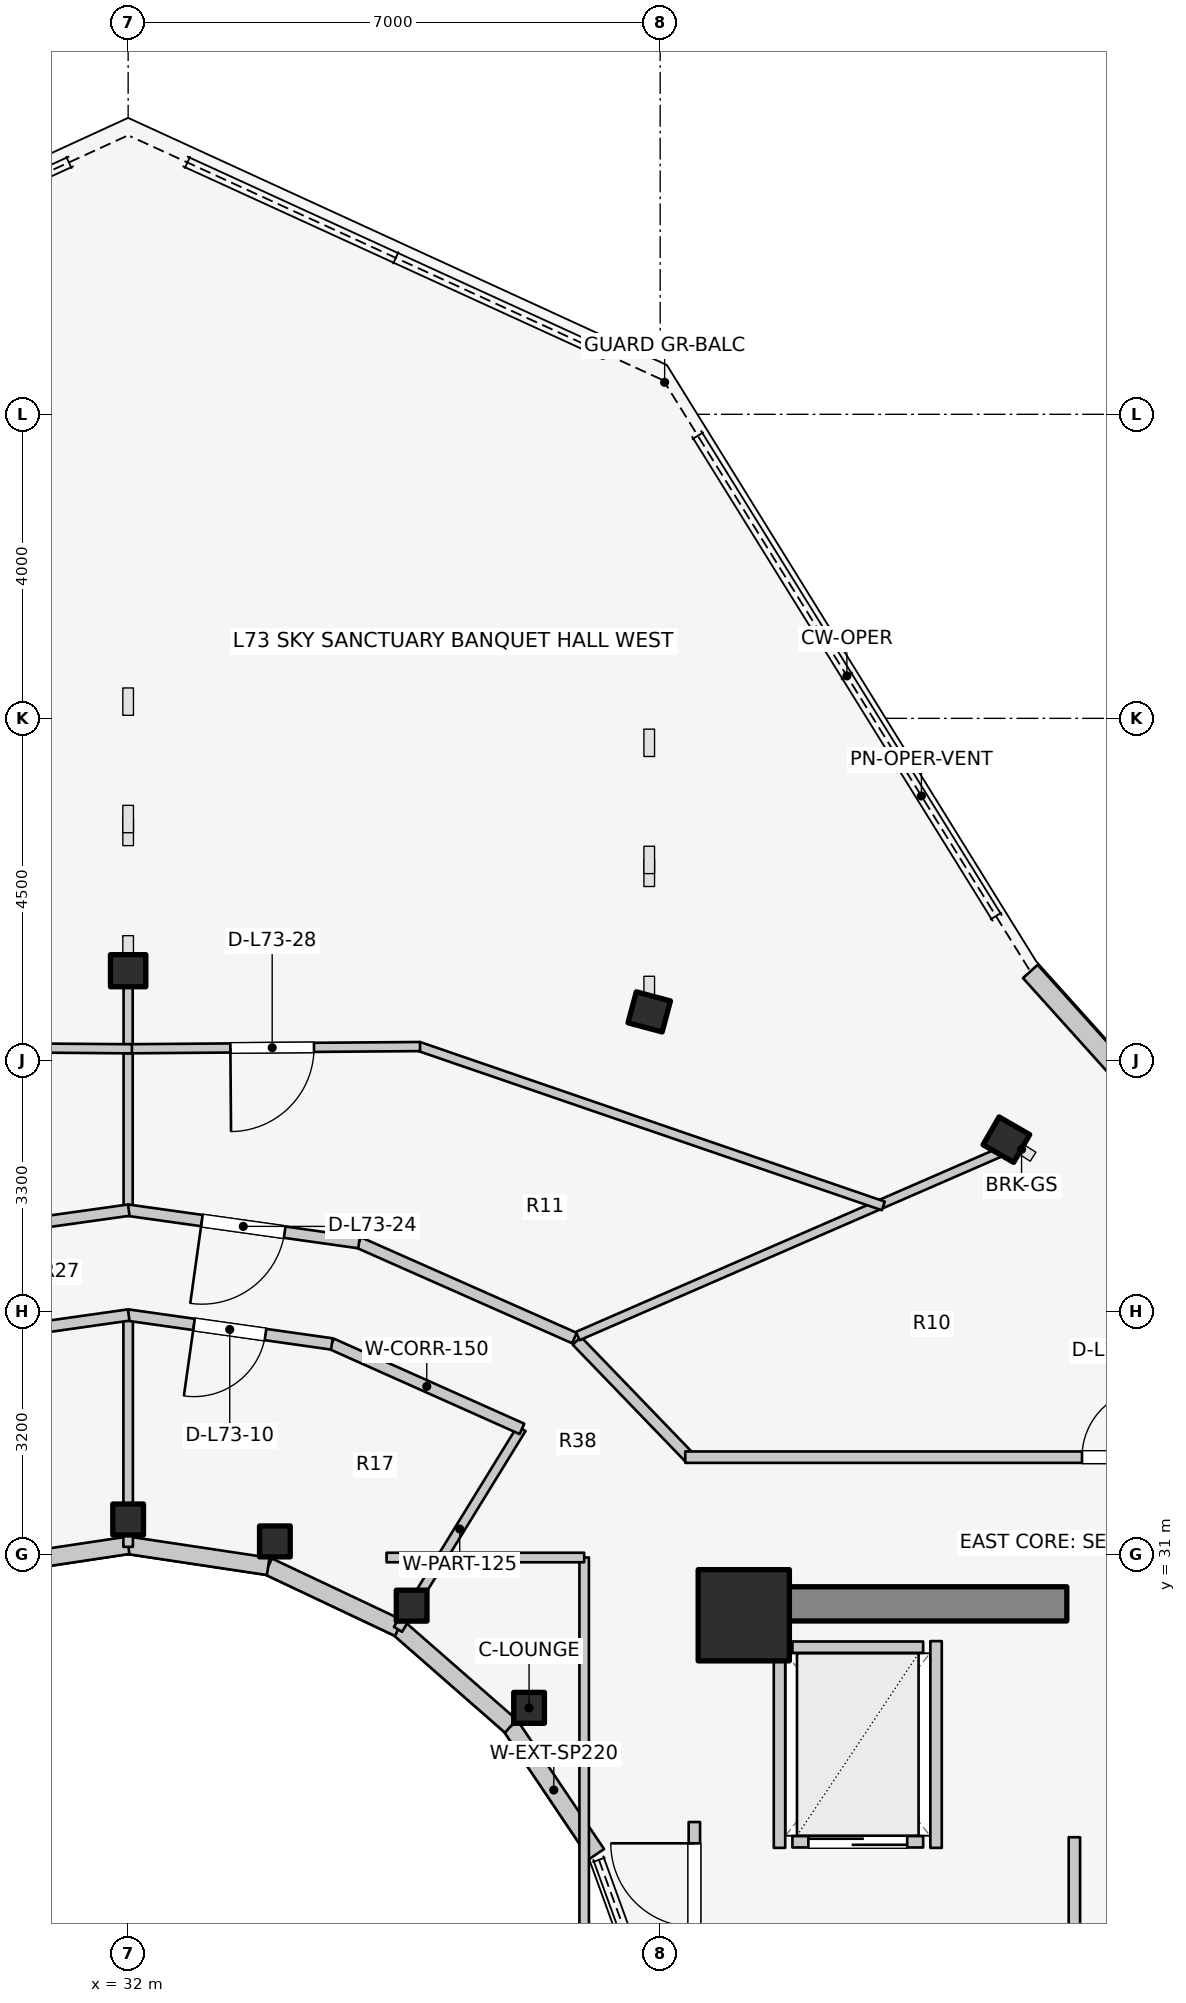
"""IFC4 building model, lengths in metres.
Left out: names, types, materials, properties, quantities, classifications, styles, units other than length and angle.
Written with IfcOpenShell. Run it as: python <this file> out.ifc"""

import sys

from ifc_helpers import new_model, si_unit, direction, frame, frame_2d, origin, origin_2d, place, context, subcontext, project, spatial, rectangle, i_section, extrude, element, fill, save


model = new_model("IFC4")
c1 = context("Model", 3, precision=1e-05, world=origin(), true_north=direction((0.0, 1.0)))
c2 = subcontext(c1, "Body", "Model", "MODEL_VIEW")
j1 = project(units=[si_unit("LENGTHUNIT", "METRE"), si_unit("PLANEANGLEUNIT", "RADIAN")], contexts=[c1])
p1 = place(None, origin())
s1 = spatial("IfcSite", under=j1, at=p1, CompositionType="ELEMENT")
p2 = place(p1, origin())
s2 = spatial("IfcBuilding", under=s1, at=p2, CompositionType="ELEMENT")
p3 = place(p2, frame((0.0, 0.0, 238.8)))
s3 = spatial("IfcBuildingStorey", under=s2, at=p3, CompositionType="ELEMENT", Elevation=238.8)
p4 = place(p3, frame((39.85, 30.35, 0.0), z_axis=(0.0, 0.0, 1.0), x_axis=(1.0, 0.0, 0.0)))
e1 = element("IfcWall", 1, at=p4, inside=s3, PredefinedType="SHEAR", context=c2, shape_type="SweptSolid", body=[
    extrude(rectangle(XDim=4.5, YDim=0.45, at=frame_2d((2.25, 0.0))), origin(), (0.0, 0.0, 1.0), 3.6),
])
p5 = place(p3, frame((40.1, 30.2, 0.0), z_axis=(0.0, 0.0, 1.0), x_axis=(1.0, 0.0, 0.0)))
e2 = element("IfcColumn", 2, at=p5, inside=s3, PredefinedType="COLUMN", context=c2, shape_type="SweptSolid", body=[
    extrude(rectangle(XDim=1.2, YDim=1.2, at=origin_2d()), origin(), (0.0, 0.0, 1.0), 3.6),
])
for number, where, z_axis, x_axis in (
    (3, (37.275, 28.982, 0.0), (0.0, 0.0, 1.0), (1.0, 0.0, 0.0)),
    (4, (35.73, 30.327, 0.0), (0.0, 0.0, 1.0), (1.0, 0.0, 0.0)),
):
    element("IfcColumn", number, at=place(p3, frame(where, z_axis=z_axis, x_axis=x_axis)), inside=s3, PredefinedType="COLUMN", context=c2, shape_type="SweptSolid", body=[
        extrude(i_section(OverallWidth=0.404, OverallDepth=0.407, WebThickness=0.027, FlangeThickness=0.044, FilletRadius=0.025, at=origin_2d()), origin(), (0.0, 0.0, 1.0), 3.6),
    ])
p6 = place(p3, frame((43.555, 36.457, 0.0), z_axis=(0.0, 0.0, 1.0), x_axis=(0.5, 0.866025403784, 0.0)))
e5 = element("IfcColumn", 5, at=p6, inside=s3, PredefinedType="COLUMN", context=c2, shape_type="SweptSolid", body=[
    extrude(i_section(OverallWidth=0.422, OverallDepth=0.465, WebThickness=0.045, FlangeThickness=0.073, FilletRadius=0.025, at=origin_2d()), origin(), (0.0, 0.0, 1.0), 3.6),
])
p7 = place(p3, frame((33.931, 31.172, 0.0), z_axis=(0.0, 0.0, 1.0), x_axis=(1.0, 0.0, 0.0)))
e6 = element("IfcColumn", 6, at=p7, inside=s3, PredefinedType="COLUMN", context=c2, shape_type="SweptSolid", body=[
    extrude(i_section(OverallWidth=0.404, OverallDepth=0.407, WebThickness=0.027, FlangeThickness=0.044, FilletRadius=0.025, at=origin_2d()), origin(), (0.0, 0.0, 1.0), 3.6),
])
p8 = place(p3, frame((38.856, 38.138, 0.0), z_axis=(0.0, 0.0, 1.0), x_axis=(0.258819045103, 0.965925826289, 0.0)))
e7 = element("IfcColumn", 7, at=p8, inside=s3, PredefinedType="COLUMN", context=c2, shape_type="SweptSolid", body=[
    extrude(i_section(OverallWidth=0.422, OverallDepth=0.465, WebThickness=0.045, FlangeThickness=0.073, FilletRadius=0.025, at=origin_2d()), origin(), (0.0, 0.0, 1.0), 3.6),
])
p9 = place(p3, frame((32.0, 31.46, 0.0), z_axis=(0.0, 0.0, 1.0), x_axis=(1.0, 0.0, 0.0)))
e8 = element("IfcColumn", 8, at=p9, inside=s3, PredefinedType="COLUMN", context=c2, shape_type="SweptSolid", body=[
    extrude(i_section(OverallWidth=0.404, OverallDepth=0.407, WebThickness=0.027, FlangeThickness=0.044, FilletRadius=0.025, at=origin_2d()), origin(), (0.0, 0.0, 1.0), 3.6),
])
p10 = place(p3, frame((32.0, 38.68, 0.0), z_axis=(0.0, 0.0, 1.0), x_axis=(0.0, 1.0, 0.0)))
e9 = element("IfcColumn", 9, at=p10, inside=s3, PredefinedType="COLUMN", context=c2, shape_type="SweptSolid", body=[
    extrude(i_section(OverallWidth=0.422, OverallDepth=0.465, WebThickness=0.045, FlangeThickness=0.073, FilletRadius=0.025, at=origin_2d()), origin(), (0.0, 0.0, 1.0), 3.6),
])
p11 = place(p3, frame((38.166, 27.06, 0.0), z_axis=(0.0, 0.0, 1.0), x_axis=(-0.558197800898, 0.829707909492, 0.0)))
e10 = element("IfcWall", 10, at=p11, inside=s3, PredefinedType="STANDARD", context=c2, shape_type="SweptSolid", body=[
    extrude(rectangle(XDim=2.027, YDim=0.23, at=frame_2d((1.013, 0.0))), origin(), (0.0, 0.0, 1.0), 2.6),
])
p12 = place(p3, frame((37.035, 28.742, 0.0), z_axis=(0.0, 0.0, 1.0), x_axis=(-0.752576694707, 0.658504607869, 0.0)))
e11 = element("IfcWall", 11, at=p12, inside=s3, PredefinedType="STANDARD", context=c2, shape_type="SweptSolid", body=[
    extrude(rectangle(XDim=1.959, YDim=0.23, at=frame_2d((0.98, 0.0))), origin(), (0.0, 0.0, 1.0), 2.6),
])
p13 = place(p3, frame((35.56, 30.032, 0.0), z_axis=(0.0, 0.0, 1.0), x_axis=(-0.904179699603, 0.427152280606, 0.0)))
e12 = element("IfcWall", 12, at=p13, inside=s3, PredefinedType="STANDARD", context=c2, shape_type="SweptSolid", body=[
    extrude(rectangle(XDim=1.899, YDim=0.23, at=frame_2d((0.95, 0.0))), origin(), (0.0, 0.0, 1.0), 2.6),
])
for number, where, z_axis, x_axis in (
    (13, (33.843, 30.843, 0.0), (0.0, 0.0, 1.0), (-0.989, 0.149, 0.0)),
    (14, (32.0, 31.12, 0.0), (0.0, 0.0, 1.0), (-0.989, -0.149, 0.0)),
):
    element("IfcWall", number, at=place(p3, frame(where, z_axis=z_axis, x_axis=x_axis)), inside=s3, PredefinedType="STANDARD", context=c2, shape_type="SweptSolid", body=[
        extrude(rectangle(XDim=1.864, YDim=0.23, at=frame_2d((0.932, 0.0))), origin(), (0.0, 0.0, 1.0), 2.6),
    ])
p14 = place(p3, frame((47.558, 34.572, 0.0), z_axis=(0.0, 0.0, 1.0), x_axis=(-0.668903560134, 0.743349196031, 0.0)))
e15 = element("IfcWall", 15, at=p14, inside=s3, PredefinedType="STANDARD", context=c2, shape_type="SweptSolid", body=[
    extrude(rectangle(XDim=5.513, YDim=0.26, at=frame_2d((2.756, 0.0))), origin(), (0.0, 0.0, 1.0), 3.29),
])
p15 = place(p3, frame((40.74, 27.22, 0.0), z_axis=(0.0, 0.0, 1.0), x_axis=(1.0, 0.0, 0.0)))
e16 = element("IfcWall", 16, at=p15, inside=s3, PredefinedType="SOLIDWALL", context=c2, shape_type="SweptSolid", body=[
    extrude(rectangle(XDim=1.72, YDim=0.15, at=frame_2d((0.86, 0.0))), origin(), (0.0, 0.0, 1.0), 3.295),
])
p16 = place(p15, frame((0.21, 0.0, 0.0)))
e17 = element("IfcOpeningElement", 17, at=p16, cuts=e16, PredefinedType="OPENING", context=c2, shape_type="SweptSolid", body=[
    extrude(rectangle(XDim=1.3, YDim=2.1, at=frame_2d((0.65, 1.05))), frame((0.0, 0.085, 0.0), z_axis=(0.0, -1.0, 0.0), x_axis=(1.0, 0.0, 0.0)), (0.0, 0.0, 1.0), 0.17),
])
p17 = place(p3, frame((40.74, 29.78, 0.0), z_axis=(0.0, 0.0, 1.0), x_axis=(1.0, 0.0, 0.0)))
e18 = element("IfcWall", 18, at=p17, inside=s3, PredefinedType="SOLIDWALL", context=c2, shape_type="SweptSolid", body=[
    extrude(rectangle(XDim=1.72, YDim=0.15, at=frame_2d((0.86, 0.0))), origin(), (0.0, 0.0, 1.0), 3.295),
])
for number, where, z_axis, x_axis in (
    (19, (40.57, 27.14, 0.0), (0.0, 0.0, 1.0), (0.0, 1.0, 0.0)),
    (20, (42.63, 27.14, 0.0), (0.0, 0.0, 1.0), (0.0, 1.0, 0.0)),
):
    element("IfcWall", number, at=place(p3, frame(where, z_axis=z_axis, x_axis=x_axis)), inside=s3, PredefinedType="SOLIDWALL", context=c2, shape_type="SweptSolid", body=[
        extrude(rectangle(XDim=2.72, YDim=0.15, at=frame_2d((1.36, 0.0))), origin(), (0.0, 0.0, 1.0), 3.295),
    ])
p18 = place(p3, frame((44.45, 24.08, 0.0), z_axis=(0.0, 0.0, 1.0), x_axis=(0.0, 1.0, 0.0)))
e21 = element("IfcWall", 21, at=p18, inside=s3, PredefinedType="PARTITIONING", context=c2, shape_type="SweptSolid", body=[
    extrude(rectangle(XDim=3.2, YDim=0.15, at=frame_2d((1.6, 0.0))), origin(), (0.0, 0.0, 1.0), 3.295),
])
p19 = place(p3, frame((39.45, 24.08, 0.0), z_axis=(0.0, 0.0, 1.0), x_axis=(0.0, 1.0, 0.0)))
e22 = element("IfcWall", 22, at=p19, inside=s3, PredefinedType="PARTITIONING", context=c2, shape_type="SweptSolid", body=[
    extrude(rectangle(XDim=3.4, YDim=0.15, at=frame_2d((1.7, 0.0))), origin(), (0.0, 0.0, 1.0), 3.295),
])
p20 = place(p19, frame((2.02, 0.0, 0.0)))
e23 = element("IfcOpeningElement", 23, at=p20, cuts=e22, PredefinedType="OPENING", context=c2, shape_type="SweptSolid", body=[
    extrude(rectangle(XDim=1.1, YDim=2.1, at=frame_2d((0.55, 1.05))), frame((0.0, 0.085, 0.0), z_axis=(0.0, -1.0, 0.0), x_axis=(1.0, 0.0, 0.0)), (0.0, 0.0, 1.0), 0.17),
])
p21 = place(p3, frame((35.55, 30.015, 0.0), z_axis=(0.0, 0.0, 1.0), x_axis=(0.523992004803, 0.851723182086, 0.0)))
e24 = element("IfcWall", 24, at=p21, inside=s3, PredefinedType="PARTITIONING", context=c2, shape_type="SweptSolid", body=[
    extrude(rectangle(XDim=3.101, YDim=0.125, at=frame_2d((1.551, 0.0))), origin(), (0.0, 0.0, 1.0), 2.672),
])
p22 = place(p3, frame((32.0, 31.1, 0.0), z_axis=(0.0, 0.0, 1.0), x_axis=(0.0, 1.0, 0.0)))
e25 = element("IfcWall", 25, at=p22, inside=s3, PredefinedType="PARTITIONING", context=c2, shape_type="SweptSolid", body=[
    extrude(rectangle(XDim=3.05, YDim=0.125, at=frame_2d((1.525, 0.0))), origin(), (0.0, 0.0, 1.0), 2.672),
])
p23 = place(p3, frame((37.181, 32.652, 0.0), z_axis=(0.0, 0.0, 1.0), x_axis=(-0.913120130558, 0.407690602257, 0.0)))
e26 = element("IfcWall", 26, at=p23, inside=s3, PredefinedType="PARTITIONING", context=c2, shape_type="SweptSolid", body=[
    extrude(rectangle(XDim=2.743, YDim=0.15, at=frame_2d((1.371, 0.0))), origin(), (0.0, 0.0, 1.0), 2.823),
])
p24 = place(p3, frame((34.68, 33.77, 0.0), z_axis=(0.0, 0.0, 1.0), x_axis=(-0.990132151456, 0.140136799779, 0.0)))
e27 = element("IfcWall", 27, at=p24, inside=s3, PredefinedType="PARTITIONING", context=c2, shape_type="SweptSolid", body=[
    extrude(rectangle(XDim=2.714, YDim=0.15, at=frame_2d((1.357, 0.0))), origin(), (0.0, 0.0, 1.0), 2.823),
])
p25 = place(p24, frame((0.882, 0.0, 0.0)))
e28 = element("IfcOpeningElement", 28, at=p25, cuts=e27, PredefinedType="OPENING", context=c2, shape_type="SweptSolid", body=[
    extrude(rectangle(XDim=0.95, YDim=2.1, at=frame_2d((0.475, 1.05))), frame((0.0, 0.085, 0.0), z_axis=(0.0, -1.0, 0.0), x_axis=(1.0, 0.0, 0.0)), (0.0, 0.0, 1.0), 0.17),
])
p26 = place(p3, frame((32.007, 34.15, 0.0), z_axis=(0.0, 0.0, 1.0), x_axis=(-0.990132151456, -0.140136799779, 0.0)))
e29 = element("IfcWall", 29, at=p26, inside=s3, PredefinedType="PARTITIONING", context=c2, shape_type="SweptSolid", body=[
    extrude(rectangle(XDim=2.714, YDim=0.15, at=frame_2d((1.357, 0.0))), origin(), (0.0, 0.0, 1.0), 2.823),
])
p27 = place(p3, frame((38.0, 25.8, 0.0), z_axis=(0.0, 0.0, 1.0), x_axis=(0.0, 1.0, 0.0)))
e30 = element("IfcWall", 30, at=p27, inside=s3, PredefinedType="PARTITIONING", context=c2, shape_type="SweptSolid", body=[
    extrude(rectangle(XDim=5.16, YDim=0.125, at=frame_2d((2.58, 0.0))), origin(), (0.0, 0.0, 1.0), 2.672),
])
p28 = place(p3, frame((35.4, 30.96, 0.0), z_axis=(0.0, 0.0, 1.0), x_axis=(1.0, 0.0, 0.0)))
e31 = element("IfcWall", 31, at=p28, inside=s3, PredefinedType="PARTITIONING", context=c2, shape_type="SweptSolid", body=[
    extrude(rectangle(XDim=2.6, YDim=0.125, at=frame_2d((1.3, 0.0))), origin(), (0.0, 0.0, 1.0), 2.816),
])
p29 = place(p3, frame((37.903, 33.812, 0.0), z_axis=(0.0, 0.0, 1.0), x_axis=(0.694032962553, -0.719943224768, 0.0)))
e32 = element("IfcWall", 32, at=p29, inside=s3, PredefinedType="PARTITIONING", context=c2, shape_type="SweptSolid", body=[
    extrude(rectangle(XDim=2.158, YDim=0.15, at=frame_2d((1.079, 0.0))), origin(), (0.0, 0.0, 1.0), 2.816),
])
p30 = place(p3, frame((39.33, 32.28, 0.0), z_axis=(0.0, 0.0, 1.0), x_axis=(1.0, 0.0, 0.0)))
e33 = element("IfcWall", 33, at=p30, inside=s3, PredefinedType="PARTITIONING", context=c2, shape_type="SweptSolid", body=[
    extrude(rectangle(XDim=7.52, YDim=0.15, at=frame_2d((3.76, 0.0))), origin(), (0.0, 0.0, 1.0), 2.816),
])
p31 = place(p30, frame((5.22, 0.0, 0.0)))
e34 = element("IfcOpeningElement", 34, at=p31, cuts=e33, PredefinedType="OPENING", context=c2, shape_type="SweptSolid", body=[
    extrude(rectangle(XDim=0.9, YDim=2.1, at=frame_2d((0.45, 1.05))), frame((0.0, 0.085, 0.0), z_axis=(0.0, -1.0, 0.0), x_axis=(1.0, 0.0, 0.0)), (0.0, 0.0, 1.0), 0.17),
])
p32 = place(p3, frame((37.915, 33.873, 0.0), z_axis=(0.0, 0.0, 1.0), x_axis=(0.916946661839, 0.399009798554, 0.0)))
e35 = element("IfcWall", 35, at=p32, inside=s3, PredefinedType="MOVABLE", context=c2, shape_type="SweptSolid", body=[
    extrude(rectangle(XDim=6.042, YDim=0.12, at=frame_2d((3.021, 0.0))), origin(), (0.0, 0.0, 1.0), 2.66),
])
p33 = place(p3, frame((32.0, 35.585, 0.0), z_axis=(0.0, 0.0, 1.0), x_axis=(0.0, 1.0, 0.0)))
e36 = element("IfcWall", 36, at=p33, inside=s3, PredefinedType="MOVABLE", context=c2, shape_type="SweptSolid", body=[
    extrude(rectangle(XDim=2.895, YDim=0.12, at=frame_2d((1.448, 0.0))), origin(), (0.0, 0.0, 1.0), 2.66),
])
p34 = place(p3, frame((37.872, 33.847, 0.0), z_axis=(0.0, 0.0, 1.0), x_axis=(-0.914384748819, 0.404846305563, 0.0)))
e37 = element("IfcWall", 37, at=p34, inside=s3, PredefinedType="PARTITIONING", context=c2, shape_type="SweptSolid", body=[
    extrude(rectangle(XDim=3.104, YDim=0.15, at=frame_2d((1.552, 0.0))), origin(), (0.0, 0.0, 1.0), 2.823),
])
p35 = place(p3, frame((35.038, 35.103, 0.0), z_axis=(0.0, 0.0, 1.0), x_axis=(-0.990295701983, 0.138976338396, 0.0)))
e38 = element("IfcWall", 38, at=p35, inside=s3, PredefinedType="PARTITIONING", context=c2, shape_type="SweptSolid", body=[
    extrude(rectangle(XDim=3.076, YDim=0.15, at=frame_2d((1.538, 0.0))), origin(), (0.0, 0.0, 1.0), 2.823),
])
p36 = place(p35, frame((0.988, 0.0, 0.0)))
e39 = element("IfcOpeningElement", 39, at=p36, cuts=e38, PredefinedType="OPENING", context=c2, shape_type="SweptSolid", body=[
    extrude(rectangle(XDim=1.1, YDim=2.1, at=frame_2d((0.55, 1.05))), frame((0.0, 0.085, 0.0), z_axis=(0.0, -1.0, 0.0), x_axis=(1.0, 0.0, 0.0)), (0.0, 0.0, 1.0), 0.17),
])
p37 = place(p3, frame((32.008, 35.53, 0.0), z_axis=(0.0, 0.0, 1.0), x_axis=(-0.990295701983, -0.138976338396, 0.0)))
e40 = element("IfcWall", 40, at=p37, inside=s3, PredefinedType="PARTITIONING", context=c2, shape_type="SweptSolid", body=[
    extrude(rectangle(XDim=3.076, YDim=0.15, at=frame_2d((1.538, 0.0))), origin(), (0.0, 0.0, 1.0), 2.823),
])
p38 = place(p3, frame((41.935, 35.586, 0.0), z_axis=(0.0, 0.0, 1.0), x_axis=(-0.945789589552, 0.324780005995, 0.0)))
e41 = element("IfcWall", 41, at=p38, inside=s3, PredefinedType="MOVABLE", context=c2, shape_type="SweptSolid", body=[
    extrude(rectangle(XDim=6.465, YDim=0.12, at=frame_2d((3.232, 0.0))), origin(), (0.0, 0.0, 1.0), 2.823),
])
p39 = place(p3, frame((35.841, 37.682, 0.0), z_axis=(0.0, 0.0, 1.0), x_axis=(-0.999971175398, -0.007592652624, 0.0)))
e42 = element("IfcWall", 42, at=p39, inside=s3, PredefinedType="MOVABLE", context=c2, shape_type="SweptSolid", body=[
    extrude(rectangle(XDim=3.891, YDim=0.12, at=frame_2d((1.945, 0.0))), origin(), (0.0, 0.0, 1.0), 2.823),
])
p40 = place(p39, frame((1.395, 0.0, 0.0)))
e43 = element("IfcOpeningElement", 43, at=p40, cuts=e42, PredefinedType="OPENING", context=c2, shape_type="SweptSolid", body=[
    extrude(rectangle(XDim=1.1, YDim=2.1, at=frame_2d((0.55, 1.05))), frame((0.0, 0.07, 0.0), z_axis=(0.0, -1.0, 0.0), x_axis=(1.0, 0.0, 0.0)), (0.0, 0.0, 1.0), 0.14),
])
p41 = place(p3, frame((32.05, 37.653, 0.0), z_axis=(0.0, 0.0, 1.0), x_axis=(-0.999971175398, 0.007592652624, 0.0)))
e44 = element("IfcWall", 44, at=p41, inside=s3, PredefinedType="MOVABLE", context=c2, shape_type="SweptSolid", body=[
    extrude(rectangle(XDim=3.891, YDim=0.12, at=frame_2d((1.945, 0.0))), origin(), (0.0, 0.0, 1.0), 2.823),
])
p42 = place(p16, origin())
e45 = element("IfcDoor", 45, at=p42, inside=s3, OperationType="DOUBLE_DOOR_SLIDING", PredefinedType="DOOR", context=c2, shape_type="SweptSolid", body=[
    extrude(rectangle(XDim=1.3, YDim=2.1, at=frame_2d((0.65, 1.05))), frame((0.0, 0.025, 0.0), z_axis=(0.0, -1.0, 0.0), x_axis=(1.0, 0.0, 0.0)), (0.0, 0.0, 1.0), 0.05),
])
fill(e17, e45)
p43 = place(p20, origin())
e46 = element("IfcDoor", 46, at=p43, inside=s3, OperationType="SINGLE_SWING_RIGHT", PredefinedType="DOOR", context=c2, shape_type="SweptSolid", body=[
    extrude(rectangle(XDim=1.1, YDim=2.1, at=frame_2d((0.55, 1.05))), frame((0.0, 0.025, 0.0), z_axis=(0.0, -1.0, 0.0), x_axis=(1.0, 0.0, 0.0)), (0.0, 0.0, 1.0), 0.05),
])
fill(e23, e46)
p44 = place(p25, origin())
e47 = element("IfcDoor", 47, at=p44, inside=s3, OperationType="SINGLE_SWING_RIGHT", PredefinedType="DOOR", context=c2, shape_type="SweptSolid", body=[
    extrude(rectangle(XDim=0.95, YDim=2.1, at=frame_2d((0.475, 1.05))), frame((0.0, 0.025, 0.0), z_axis=(0.0, -1.0, 0.0), x_axis=(1.0, 0.0, 0.0)), (0.0, 0.0, 1.0), 0.05),
])
fill(e28, e47)
p45 = place(p31, origin())
e48 = element("IfcDoor", 48, at=p45, inside=s3, OperationType="SINGLE_SWING_RIGHT", PredefinedType="DOOR", context=c2, shape_type="SweptSolid", body=[
    extrude(rectangle(XDim=0.9, YDim=2.1, at=frame_2d((0.45, 1.05))), frame((0.0, 0.025, 0.0), z_axis=(0.0, -1.0, 0.0), x_axis=(1.0, 0.0, 0.0)), (0.0, 0.0, 1.0), 0.05),
])
fill(e34, e48)
p46 = place(p36, origin())
e49 = element("IfcDoor", 49, at=p46, inside=s3, OperationType="SINGLE_SWING_RIGHT", PredefinedType="DOOR", context=c2, shape_type="SweptSolid", body=[
    extrude(rectangle(XDim=1.1, YDim=2.1, at=frame_2d((0.55, 1.05))), frame((0.0, 0.025, 0.0), z_axis=(0.0, -1.0, 0.0), x_axis=(1.0, 0.0, 0.0)), (0.0, 0.0, 1.0), 0.05),
])
fill(e39, e49)
p47 = place(p40, origin())
e50 = element("IfcDoor", 50, at=p47, inside=s3, OperationType="SINGLE_SWING_RIGHT", PredefinedType="DOOR", context=c2, shape_type="SweptSolid", body=[
    extrude(rectangle(XDim=1.1, YDim=2.1, at=frame_2d((0.55, 1.05))), frame((0.0, 0.025, 0.0), z_axis=(0.0, -1.0, 0.0), x_axis=(1.0, 0.0, 0.0)), (0.0, 0.0, 1.0), 0.05),
])
fill(e43, e50)
save(model, sys.argv[1])
